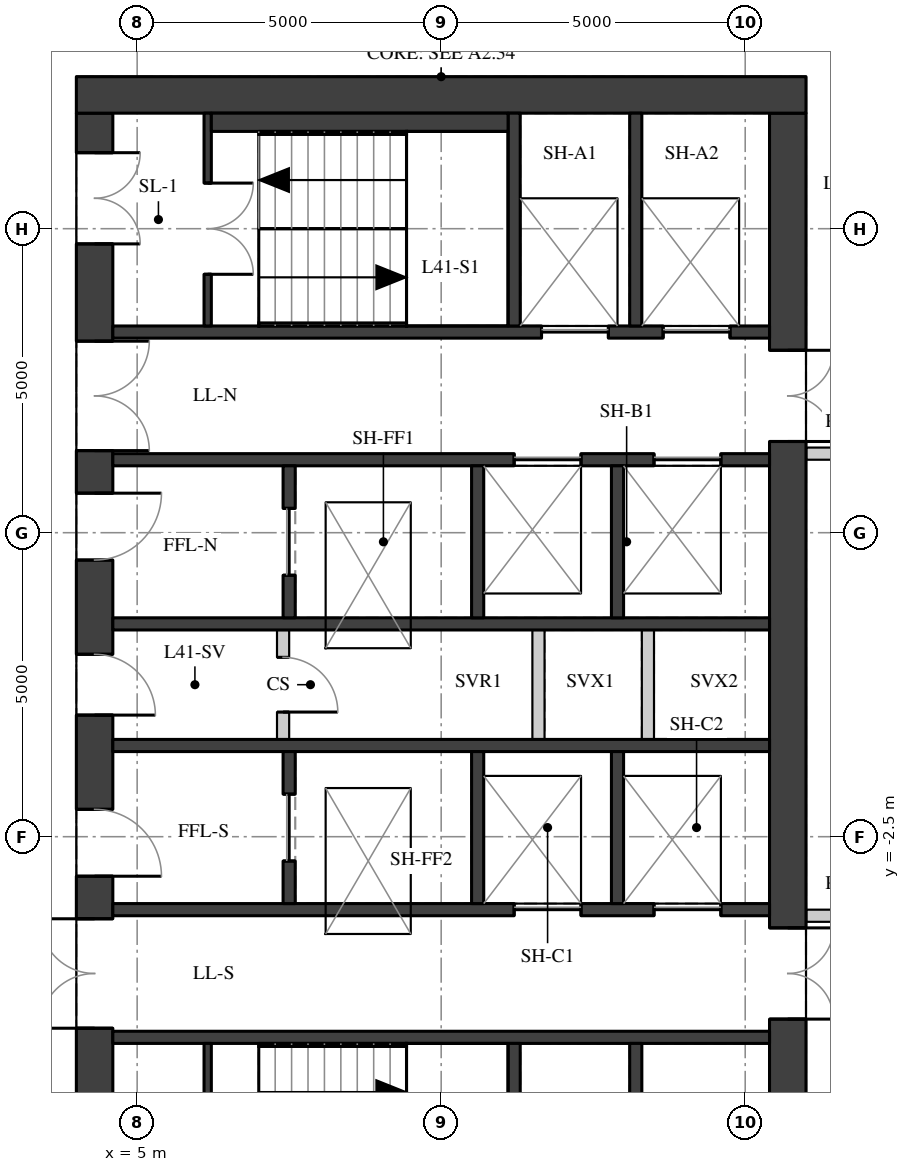
"""IFC4 building model, lengths in metres.
Left out: names, types, materials, properties, quantities, classifications, styles, units other than length and angle.
Written with IfcOpenShell. Run it as: python <this file> out.ifc"""

import sys

from ifc_helpers import new_model, si_unit, direction, frame, frame_2d, origin, place, context, subcontext, project, spatial, rectangle, extrude, element, fill, save


model = new_model("IFC4")
c1 = context("Model", 3, precision=1e-05, world=origin(), true_north=direction((0.0, 1.0)))
c2 = subcontext(c1, "Body", "Model", "MODEL_VIEW")
j1 = project(units=[si_unit("LENGTHUNIT", "METRE"), si_unit("PLANEANGLEUNIT", "RADIAN")], contexts=[c1])
p1 = place(None, origin())
s1 = spatial("IfcSite", under=j1, at=p1, CompositionType="ELEMENT")
p2 = place(p1, origin())
s2 = spatial("IfcBuilding", under=s1, at=p2, CompositionType="ELEMENT")
p3 = place(p2, frame((0.0, 0.0, 148.4)))
s3 = spatial("IfcBuildingStorey", under=s2, at=p3, CompositionType="ELEMENT", Elevation=148.4)
p4 = place(p3, frame((4.3, -9.4, 0.0), z_axis=(0.0, 0.0, 1.0), x_axis=(0.0, 1.0, 0.0)))
e1 = element("IfcWall", 1, at=p4, inside=s3, PredefinedType="SHEAR", context=c2, shape_type="SweptSolid", body=[
    extrude(rectangle(XDim=18.8, YDim=0.6, at=frame_2d((9.4, 0.0))), origin(), (0.0, 0.0, 1.0), 3.02),
])
p5 = place(p4, frame((0.65, 0.0, 0.0)))
e2 = element("IfcOpeningElement", 2, at=p5, cuts=e1, PredefinedType="OPENING", context=c2, shape_type="SweptSolid", body=[
    extrude(rectangle(XDim=1.5, YDim=2.1, at=frame_2d((0.75, 1.05))), frame((0.0, 0.31, 0.0), z_axis=(0.0, -1.0, 0.0), x_axis=(1.0, 0.0, 0.0)), (0.0, 0.0, 1.0), 0.62),
])
p6 = place(p4, frame((3.75, 0.0, 0.0)))
e3 = element("IfcOpeningElement", 3, at=p6, cuts=e1, PredefinedType="OPENING", context=c2, shape_type="SweptSolid", body=[
    extrude(rectangle(XDim=1.8, YDim=2.1, at=frame_2d((0.9, 1.05))), frame((0.0, 0.31, 0.0), z_axis=(0.0, -1.0, 0.0), x_axis=(1.0, 0.0, 0.0)), (0.0, 0.0, 1.0), 0.62),
])
p7 = place(p4, frame((6.25, 0.0, 0.0)))
e4 = element("IfcOpeningElement", 4, at=p7, cuts=e1, PredefinedType="OPENING", context=c2, shape_type="SweptSolid", body=[
    extrude(rectangle(XDim=1.1, YDim=2.1, at=frame_2d((0.55, 1.05))), frame((0.0, 0.31, 0.0), z_axis=(0.0, -1.0, 0.0), x_axis=(1.0, 0.0, 0.0)), (0.0, 0.0, 1.0), 0.62),
])
p8 = place(p4, frame((8.9, 0.0, 0.0)))
e5 = element("IfcOpeningElement", 5, at=p8, cuts=e1, PredefinedType="OPENING", context=c2, shape_type="SweptSolid", body=[
    extrude(rectangle(XDim=1.0, YDim=2.1, at=frame_2d((0.5, 1.05))), frame((0.0, 0.31, 0.0), z_axis=(0.0, -1.0, 0.0), x_axis=(1.0, 0.0, 0.0)), (0.0, 0.0, 1.0), 0.62),
])
p9 = place(p4, frame((11.45, 0.0, 0.0)))
e6 = element("IfcOpeningElement", 6, at=p9, cuts=e1, PredefinedType="OPENING", context=c2, shape_type="SweptSolid", body=[
    extrude(rectangle(XDim=1.1, YDim=2.1, at=frame_2d((0.55, 1.05))), frame((0.0, 0.31, 0.0), z_axis=(0.0, -1.0, 0.0), x_axis=(1.0, 0.0, 0.0)), (0.0, 0.0, 1.0), 0.62),
])
p10 = place(p4, frame((13.25, 0.0, 0.0)))
e7 = element("IfcOpeningElement", 7, at=p10, cuts=e1, PredefinedType="OPENING", context=c2, shape_type="SweptSolid", body=[
    extrude(rectangle(XDim=1.8, YDim=2.1, at=frame_2d((0.9, 1.05))), frame((0.0, 0.31, 0.0), z_axis=(0.0, -1.0, 0.0), x_axis=(1.0, 0.0, 0.0)), (0.0, 0.0, 1.0), 0.62),
])
p11 = place(p4, frame((16.65, 0.0, 0.0)))
e8 = element("IfcOpeningElement", 8, at=p11, cuts=e1, PredefinedType="OPENING", context=c2, shape_type="SweptSolid", body=[
    extrude(rectangle(XDim=1.5, YDim=2.1, at=frame_2d((0.75, 1.05))), frame((0.0, 0.31, 0.0), z_axis=(0.0, -1.0, 0.0), x_axis=(1.0, 0.0, 0.0)), (0.0, 0.0, 1.0), 0.62),
])
p12 = place(p3, frame((15.7, -9.4, 0.0), z_axis=(0.0, 0.0, 1.0), x_axis=(0.0, 1.0, 0.0)))
e9 = element("IfcWall", 9, at=p12, inside=s3, PredefinedType="SHEAR", context=c2, shape_type="SweptSolid", body=[
    extrude(rectangle(XDim=18.8, YDim=0.6, at=frame_2d((9.4, 0.0))), origin(), (0.0, 0.0, 1.0), 3.02),
])
p13 = place(p12, frame((13.4, 0.0, 0.0)))
e10 = element("IfcOpeningElement", 10, at=p13, cuts=e9, PredefinedType="OPENING", context=c2, shape_type="SweptSolid", body=[
    extrude(rectangle(XDim=1.5, YDim=2.1, at=frame_2d((0.75, 1.05))), frame((0.0, 0.31, 0.0), z_axis=(0.0, -1.0, 0.0), x_axis=(1.0, 0.0, 0.0)), (0.0, 0.0, 1.0), 0.62),
])
p14 = place(p12, frame((3.9, 0.0, 0.0)))
e11 = element("IfcOpeningElement", 11, at=p14, cuts=e9, PredefinedType="OPENING", context=c2, shape_type="SweptSolid", body=[
    extrude(rectangle(XDim=1.5, YDim=2.1, at=frame_2d((0.75, 1.05))), frame((0.0, 0.31, 0.0), z_axis=(0.0, -1.0, 0.0), x_axis=(1.0, 0.0, 0.0)), (0.0, 0.0, 1.0), 0.62),
])
p15 = place(p3, frame((4.0, 9.7, 0.0), z_axis=(0.0, 0.0, 1.0), x_axis=(1.0, 0.0, 0.0)))
e12 = element("IfcWall", 12, at=p15, inside=s3, PredefinedType="SHEAR", context=c2, shape_type="SweptSolid", body=[
    extrude(rectangle(XDim=12.0, YDim=0.6, at=frame_2d((6.0, 0.0))), origin(), (0.0, 0.0, 1.0), 3.02),
])
p16 = place(p3, frame((4.6, 5.8, 0.0), z_axis=(0.0, 0.0, 1.0), x_axis=(1.0, 0.0, 0.0)))
e13 = element("IfcWall", 13, at=p16, inside=s3, PredefinedType="SHEAR", context=c2, shape_type="SweptSolid", body=[
    extrude(rectangle(XDim=10.8, YDim=0.2, at=frame_2d((5.4, 0.0))), origin(), (0.0, 0.0, 1.0), 3.02),
])
p17 = place(p16, frame((7.05, 0.0, 0.0)))
e14 = element("IfcOpeningElement", 14, at=p17, cuts=e13, PredefinedType="OPENING", context=c2, shape_type="SweptSolid", body=[
    extrude(rectangle(XDim=1.1, YDim=2.1, at=frame_2d((0.55, 1.05))), frame((0.0, 0.11, 0.0), z_axis=(0.0, -1.0, 0.0), x_axis=(1.0, 0.0, 0.0)), (0.0, 0.0, 1.0), 0.22),
])
p18 = place(p16, frame((9.05, 0.0, 0.0)))
e15 = element("IfcOpeningElement", 15, at=p18, cuts=e13, PredefinedType="OPENING", context=c2, shape_type="SweptSolid", body=[
    extrude(rectangle(XDim=1.1, YDim=2.1, at=frame_2d((0.55, 1.05))), frame((0.0, 0.11, 0.0), z_axis=(0.0, -1.0, 0.0), x_axis=(1.0, 0.0, 0.0)), (0.0, 0.0, 1.0), 0.22),
])
p19 = place(p3, frame((4.6, 3.7, 0.0), z_axis=(0.0, 0.0, 1.0), x_axis=(1.0, 0.0, 0.0)))
e16 = element("IfcWall", 16, at=p19, inside=s3, PredefinedType="SHEAR", context=c2, shape_type="SweptSolid", body=[
    extrude(rectangle(XDim=10.8, YDim=0.2, at=frame_2d((5.4, 0.0))), origin(), (0.0, 0.0, 1.0), 3.02),
])
p20 = place(p19, frame((6.6, 0.0, 0.0)))
e17 = element("IfcOpeningElement", 17, at=p20, cuts=e16, PredefinedType="OPENING", context=c2, shape_type="SweptSolid", body=[
    extrude(rectangle(XDim=1.1, YDim=2.1, at=frame_2d((0.55, 1.05))), frame((0.0, 0.11, 0.0), z_axis=(0.0, -1.0, 0.0), x_axis=(1.0, 0.0, 0.0)), (0.0, 0.0, 1.0), 0.22),
])
p21 = place(p19, frame((8.9, 0.0, 0.0)))
e18 = element("IfcOpeningElement", 18, at=p21, cuts=e16, PredefinedType="OPENING", context=c2, shape_type="SweptSolid", body=[
    extrude(rectangle(XDim=1.1, YDim=2.1, at=frame_2d((0.55, 1.05))), frame((0.0, 0.11, 0.0), z_axis=(0.0, -1.0, 0.0), x_axis=(1.0, 0.0, 0.0)), (0.0, 0.0, 1.0), 0.22),
])
for number, where, z_axis, x_axis in (
    (19, (4.6, 1.0, 0.0), (0.0, 0.0, 1.0), (1.0, 0.0, 0.0)),
    (20, (4.6, -1.0, 0.0), (0.0, 0.0, 1.0), (1.0, 0.0, 0.0)),
):
    element("IfcWall", number, at=place(p3, frame(where, z_axis=z_axis, x_axis=x_axis)), inside=s3, PredefinedType="SHEAR", context=c2, shape_type="SweptSolid", body=[
        extrude(rectangle(XDim=10.8, YDim=0.2, at=frame_2d((5.4, 0.0))), origin(), (0.0, 0.0, 1.0), 3.02),
    ])
p22 = place(p3, frame((4.6, -3.7, 0.0), z_axis=(0.0, 0.0, 1.0), x_axis=(1.0, 0.0, 0.0)))
e21 = element("IfcWall", 21, at=p22, inside=s3, PredefinedType="SHEAR", context=c2, shape_type="SweptSolid", body=[
    extrude(rectangle(XDim=10.8, YDim=0.2, at=frame_2d((5.4, 0.0))), origin(), (0.0, 0.0, 1.0), 3.02),
])
p23 = place(p22, frame((6.6, 0.0, 0.0)))
e22 = element("IfcOpeningElement", 22, at=p23, cuts=e21, PredefinedType="OPENING", context=c2, shape_type="SweptSolid", body=[
    extrude(rectangle(XDim=1.1, YDim=2.1, at=frame_2d((0.55, 1.05))), frame((0.0, 0.11, 0.0), z_axis=(0.0, -1.0, 0.0), x_axis=(1.0, 0.0, 0.0)), (0.0, 0.0, 1.0), 0.22),
])
p24 = place(p22, frame((8.9, 0.0, 0.0)))
e23 = element("IfcOpeningElement", 23, at=p24, cuts=e21, PredefinedType="OPENING", context=c2, shape_type="SweptSolid", body=[
    extrude(rectangle(XDim=1.1, YDim=2.1, at=frame_2d((0.55, 1.05))), frame((0.0, 0.11, 0.0), z_axis=(0.0, -1.0, 0.0), x_axis=(1.0, 0.0, 0.0)), (0.0, 0.0, 1.0), 0.22),
])
p25 = place(p3, frame((4.6, -5.8, 0.0), z_axis=(0.0, 0.0, 1.0), x_axis=(1.0, 0.0, 0.0)))
e24 = element("IfcWall", 24, at=p25, inside=s3, PredefinedType="SHEAR", context=c2, shape_type="SweptSolid", body=[
    extrude(rectangle(XDim=10.8, YDim=0.2, at=frame_2d((5.4, 0.0))), origin(), (0.0, 0.0, 1.0), 3.02),
])
for number, where, z_axis, x_axis in (
    (25, (11.2, 5.9, 0.0), (0.0, 0.0, 1.0), (0.0, 1.0, 0.0)),
    (26, (11.2, -9.4, 0.0), (0.0, 0.0, 1.0), (0.0, 1.0, 0.0)),
    (27, (13.2, 5.9, 0.0), (0.0, 0.0, 1.0), (0.0, 1.0, 0.0)),
    (28, (13.2, -9.4, 0.0), (0.0, 0.0, 1.0), (0.0, 1.0, 0.0)),
):
    element("IfcWall", number, at=place(p3, frame(where, z_axis=z_axis, x_axis=x_axis)), inside=s3, PredefinedType="SHEAR", context=c2, shape_type="SweptSolid", body=[
        extrude(rectangle(XDim=3.5, YDim=0.2, at=frame_2d((1.75, 0.0))), origin(), (0.0, 0.0, 1.0), 3.02),
    ])
p26 = place(p3, frame((7.5, 1.1, 0.0), z_axis=(0.0, 0.0, 1.0), x_axis=(0.0, 1.0, 0.0)))
e29 = element("IfcWall", 29, at=p26, inside=s3, PredefinedType="SHEAR", context=c2, shape_type="SweptSolid", body=[
    extrude(rectangle(XDim=2.5, YDim=0.2, at=frame_2d((1.25, 0.0))), origin(), (0.0, 0.0, 1.0), 3.02),
])
p27 = place(p26, frame((0.7, 0.0, 0.0)))
e30 = element("IfcOpeningElement", 30, at=p27, cuts=e29, PredefinedType="OPENING", context=c2, shape_type="SweptSolid", body=[
    extrude(rectangle(XDim=1.1, YDim=2.1, at=frame_2d((0.55, 1.05))), frame((0.0, 0.11, 0.0), z_axis=(0.0, -1.0, 0.0), x_axis=(1.0, 0.0, 0.0)), (0.0, 0.0, 1.0), 0.22),
])
p28 = place(p3, frame((7.5, -3.6, 0.0), z_axis=(0.0, 0.0, 1.0), x_axis=(0.0, 1.0, 0.0)))
e31 = element("IfcWall", 31, at=p28, inside=s3, PredefinedType="SHEAR", context=c2, shape_type="SweptSolid", body=[
    extrude(rectangle(XDim=2.5, YDim=0.2, at=frame_2d((1.25, 0.0))), origin(), (0.0, 0.0, 1.0), 3.02),
])
p29 = place(p28, frame((0.7, 0.0, 0.0)))
e32 = element("IfcOpeningElement", 32, at=p29, cuts=e31, PredefinedType="OPENING", context=c2, shape_type="SweptSolid", body=[
    extrude(rectangle(XDim=1.1, YDim=2.1, at=frame_2d((0.55, 1.05))), frame((0.0, 0.11, 0.0), z_axis=(0.0, -1.0, 0.0), x_axis=(1.0, 0.0, 0.0)), (0.0, 0.0, 1.0), 0.22),
])
for number, where, z_axis, x_axis in (
    (33, (10.6, 1.1, 0.0), (0.0, 0.0, 1.0), (0.0, 1.0, 0.0)),
    (34, (10.6, -3.6, 0.0), (0.0, 0.0, 1.0), (0.0, 1.0, 0.0)),
    (35, (12.9, 1.1, 0.0), (0.0, 0.0, 1.0), (0.0, 1.0, 0.0)),
    (36, (12.9, -3.6, 0.0), (0.0, 0.0, 1.0), (0.0, 1.0, 0.0)),
):
    element("IfcWall", number, at=place(p3, frame(where, z_axis=z_axis, x_axis=x_axis)), inside=s3, PredefinedType="SHEAR", context=c2, shape_type="SweptSolid", body=[
        extrude(rectangle(XDim=2.5, YDim=0.2, at=frame_2d((1.25, 0.0))), origin(), (0.0, 0.0, 1.0), 3.02),
    ])
p30 = place(p3, frame((6.16, 5.9, 0.0), z_axis=(0.0, 0.0, 1.0), x_axis=(0.0, 1.0, 0.0)))
e37 = element("IfcWall", 37, at=p30, inside=s3, PredefinedType="SHEAR", context=c2, shape_type="SweptSolid", body=[
    extrude(rectangle(XDim=3.5, YDim=0.12, at=frame_2d((1.75, 0.0))), origin(), (0.0, 0.0, 1.0), 3.02),
])
p31 = place(p30, frame((0.85, 0.0, 0.0)))
e38 = element("IfcOpeningElement", 38, at=p31, cuts=e37, PredefinedType="OPENING", context=c2, shape_type="SweptSolid", body=[
    extrude(rectangle(XDim=1.5, YDim=2.1, at=frame_2d((0.75, 1.05))), frame((0.0, 0.07, 0.0), z_axis=(0.0, -1.0, 0.0), x_axis=(1.0, 0.0, 0.0)), (0.0, 0.0, 1.0), 0.14),
])
p32 = place(p3, frame((6.16, -9.4, 0.0), z_axis=(0.0, 0.0, 1.0), x_axis=(0.0, 1.0, 0.0)))
e39 = element("IfcWall", 39, at=p32, inside=s3, PredefinedType="SHEAR", context=c2, shape_type="SweptSolid", body=[
    extrude(rectangle(XDim=3.5, YDim=0.12, at=frame_2d((1.75, 0.0))), origin(), (0.0, 0.0, 1.0), 3.02),
])
p33 = place(p32, frame((1.15, 0.0, 0.0)))
e40 = element("IfcOpeningElement", 40, at=p33, cuts=e39, PredefinedType="OPENING", context=c2, shape_type="SweptSolid", body=[
    extrude(rectangle(XDim=1.5, YDim=2.1, at=frame_2d((0.75, 1.05))), frame((0.0, 0.07, 0.0), z_axis=(0.0, -1.0, 0.0), x_axis=(1.0, 0.0, 0.0)), (0.0, 0.0, 1.0), 0.14),
])
p34 = place(p3, frame((7.4, -0.9, 0.0), z_axis=(0.0, 0.0, 1.0), x_axis=(0.0, 1.0, 0.0)))
e41 = element("IfcWall", 41, at=p34, inside=s3, PredefinedType="PARTITIONING", context=c2, shape_type="SweptSolid", body=[
    extrude(rectangle(XDim=1.8, YDim=0.2, at=frame_2d((0.9, 0.0))), origin(), (0.0, 0.0, 1.0), 3.02),
])
p35 = place(p34, frame((0.45, 0.0, 0.0)))
e42 = element("IfcOpeningElement", 42, at=p35, cuts=e41, PredefinedType="OPENING", context=c2, shape_type="SweptSolid", body=[
    extrude(rectangle(XDim=0.9, YDim=2.1, at=frame_2d((0.45, 1.05))), frame((0.0, 0.11, 0.0), z_axis=(0.0, -1.0, 0.0), x_axis=(1.0, 0.0, 0.0)), (0.0, 0.0, 1.0), 0.22),
])
for number, where, z_axis, x_axis in (
    (43, (11.6, -0.9, 0.0), (0.0, 0.0, 1.0), (0.0, 1.0, 0.0)),
    (44, (13.4, -0.9, 0.0), (0.0, 0.0, 1.0), (0.0, 1.0, 0.0)),
):
    element("IfcWall", number, at=place(p3, frame(where, z_axis=z_axis, x_axis=x_axis)), inside=s3, PredefinedType="PARTITIONING", context=c2, shape_type="SweptSolid", body=[
        extrude(rectangle(XDim=1.8, YDim=0.2, at=frame_2d((0.9, 0.0))), origin(), (0.0, 0.0, 1.0), 3.02),
    ])
p36 = place(p3, frame((6.22, 9.25, 0.0), z_axis=(0.0, 0.0, 1.0), x_axis=(1.0, 0.0, 0.0)))
e45 = element("IfcWall", 45, at=p36, inside=s3, PredefinedType="PARTITIONING", context=c2, shape_type="SweptSolid", body=[
    extrude(rectangle(XDim=4.88, YDim=0.3, at=frame_2d((2.44, 0.0))), origin(), (0.0, 0.0, 1.0), 3.02),
])
for number, where, z_axis, x_axis in (
    (46, (17.5, 3.8, 0.0), (0.0, 0.0, 1.0), (-1.0, 0.0, 0.0)),
    (47, (16.004, -3.8, 0.0), (0.0, 0.0, 1.0), (1.0, 0.0, 0.0)),
):
    element("IfcWall", number, at=place(p3, frame(where, z_axis=z_axis, x_axis=x_axis)), inside=s3, PredefinedType="PARTITIONING", context=c2, shape_type="SweptSolid", body=[
        extrude(rectangle(XDim=1.496, YDim=0.2, at=frame_2d((0.748, 0.0))), origin(), (0.0, 0.0, 1.0), 2.57),
    ])
p37 = place(p6, origin())
e48 = element("IfcDoor", 48, at=p37, inside=s3, OperationType="DOUBLE_DOOR_SINGLE_SWING", PredefinedType="DOOR", context=c2, shape_type="SweptSolid", body=[
    extrude(rectangle(XDim=1.8, YDim=2.1, at=frame_2d((0.9, 1.05))), frame((0.0, 0.025, 0.0), z_axis=(0.0, -1.0, 0.0), x_axis=(1.0, 0.0, 0.0)), (0.0, 0.0, 1.0), 0.05),
])
fill(e3, e48)
p38 = place(p7, origin())
e49 = element("IfcDoor", 49, at=p38, inside=s3, OperationType="SINGLE_SWING_RIGHT", PredefinedType="DOOR", context=c2, shape_type="SweptSolid", body=[
    extrude(rectangle(XDim=1.1, YDim=2.1, at=frame_2d((0.55, 1.05))), frame((0.0, 0.025, 0.0), z_axis=(0.0, -1.0, 0.0), x_axis=(1.0, 0.0, 0.0)), (0.0, 0.0, 1.0), 0.05),
])
fill(e4, e49)
p39 = place(p8, origin())
e50 = element("IfcDoor", 50, at=p39, inside=s3, OperationType="SINGLE_SWING_RIGHT", PredefinedType="DOOR", context=c2, shape_type="SweptSolid", body=[
    extrude(rectangle(XDim=1.0, YDim=2.1, at=frame_2d((0.5, 1.05))), frame((0.0, 0.025, 0.0), z_axis=(0.0, -1.0, 0.0), x_axis=(1.0, 0.0, 0.0)), (0.0, 0.0, 1.0), 0.05),
])
fill(e5, e50)
p40 = place(p9, origin())
e51 = element("IfcDoor", 51, at=p40, inside=s3, OperationType="SINGLE_SWING_LEFT", PredefinedType="DOOR", context=c2, shape_type="SweptSolid", body=[
    extrude(rectangle(XDim=1.1, YDim=2.1, at=frame_2d((0.55, 1.05))), frame((0.0, 0.025, 0.0), z_axis=(0.0, -1.0, 0.0), x_axis=(1.0, 0.0, 0.0)), (0.0, 0.0, 1.0), 0.05),
])
fill(e6, e51)
p41 = place(p10, origin())
e52 = element("IfcDoor", 52, at=p41, inside=s3, OperationType="DOUBLE_DOOR_SINGLE_SWING", PredefinedType="DOOR", context=c2, shape_type="SweptSolid", body=[
    extrude(rectangle(XDim=1.8, YDim=2.1, at=frame_2d((0.9, 1.05))), frame((0.0, 0.025, 0.0), z_axis=(0.0, -1.0, 0.0), x_axis=(1.0, 0.0, 0.0)), (0.0, 0.0, 1.0), 0.05),
])
fill(e7, e52)
p42 = place(p11, origin())
e53 = element("IfcDoor", 53, at=p42, inside=s3, OperationType="DOUBLE_DOOR_SINGLE_SWING", PredefinedType="DOOR", context=c2, shape_type="SweptSolid", body=[
    extrude(rectangle(XDim=1.5, YDim=2.1, at=frame_2d((0.75, 1.05))), frame((0.0, 0.025, 0.0), z_axis=(0.0, -1.0, 0.0), x_axis=(1.0, 0.0, 0.0)), (0.0, 0.0, 1.0), 0.05),
])
fill(e8, e53)
p43 = place(p13, origin())
e54 = element("IfcDoor", 54, at=p43, inside=s3, OperationType="DOUBLE_DOOR_SINGLE_SWING", PredefinedType="DOOR", context=c2, shape_type="SweptSolid", body=[
    extrude(rectangle(XDim=1.5, YDim=2.1, at=frame_2d((0.75, 1.05))), frame((0.0, 0.025, 0.0), z_axis=(0.0, -1.0, 0.0), x_axis=(1.0, 0.0, 0.0)), (0.0, 0.0, 1.0), 0.05),
])
fill(e10, e54)
p44 = place(p14, origin())
e55 = element("IfcDoor", 55, at=p44, inside=s3, OperationType="DOUBLE_DOOR_SINGLE_SWING", PredefinedType="DOOR", context=c2, shape_type="SweptSolid", body=[
    extrude(rectangle(XDim=1.5, YDim=2.1, at=frame_2d((0.75, 1.05))), frame((0.0, 0.025, 0.0), z_axis=(0.0, -1.0, 0.0), x_axis=(1.0, 0.0, 0.0)), (0.0, 0.0, 1.0), 0.05),
])
fill(e11, e55)
p45 = place(p31, origin())
e56 = element("IfcDoor", 56, at=p45, inside=s3, OperationType="DOUBLE_DOOR_SINGLE_SWING", PredefinedType="DOOR", context=c2, shape_type="SweptSolid", body=[
    extrude(rectangle(XDim=1.5, YDim=2.1, at=frame_2d((0.75, 1.05))), frame((0.0, 0.025, 0.0), z_axis=(0.0, -1.0, 0.0), x_axis=(1.0, 0.0, 0.0)), (0.0, 0.0, 1.0), 0.05),
])
fill(e38, e56)
p46 = place(p17, origin())
e57 = element("IfcDoor", 57, at=p46, inside=s3, OperationType="DOUBLE_DOOR_SLIDING", PredefinedType="DOOR", context=c2, shape_type="SweptSolid", body=[
    extrude(rectangle(XDim=1.1, YDim=2.1, at=frame_2d((0.55, 1.05))), frame((0.0, 0.025, 0.0), z_axis=(0.0, -1.0, 0.0), x_axis=(1.0, 0.0, 0.0)), (0.0, 0.0, 1.0), 0.05),
])
fill(e14, e57)
p47 = place(p18, origin())
e58 = element("IfcDoor", 58, at=p47, inside=s3, OperationType="DOUBLE_DOOR_SLIDING", PredefinedType="DOOR", context=c2, shape_type="SweptSolid", body=[
    extrude(rectangle(XDim=1.1, YDim=2.1, at=frame_2d((0.55, 1.05))), frame((0.0, 0.025, 0.0), z_axis=(0.0, -1.0, 0.0), x_axis=(1.0, 0.0, 0.0)), (0.0, 0.0, 1.0), 0.05),
])
fill(e15, e58)
p48 = place(p20, origin())
e59 = element("IfcDoor", 59, at=p48, inside=s3, OperationType="DOUBLE_DOOR_SLIDING", PredefinedType="DOOR", context=c2, shape_type="SweptSolid", body=[
    extrude(rectangle(XDim=1.1, YDim=2.1, at=frame_2d((0.55, 1.05))), frame((0.0, 0.025, 0.0), z_axis=(0.0, -1.0, 0.0), x_axis=(1.0, 0.0, 0.0)), (0.0, 0.0, 1.0), 0.05),
])
fill(e17, e59)
p49 = place(p21, origin())
e60 = element("IfcDoor", 60, at=p49, inside=s3, OperationType="DOUBLE_DOOR_SLIDING", PredefinedType="DOOR", context=c2, shape_type="SweptSolid", body=[
    extrude(rectangle(XDim=1.1, YDim=2.1, at=frame_2d((0.55, 1.05))), frame((0.0, 0.025, 0.0), z_axis=(0.0, -1.0, 0.0), x_axis=(1.0, 0.0, 0.0)), (0.0, 0.0, 1.0), 0.05),
])
fill(e18, e60)
p50 = place(p23, origin())
e61 = element("IfcDoor", 61, at=p50, inside=s3, OperationType="DOUBLE_DOOR_SLIDING", PredefinedType="DOOR", context=c2, shape_type="SweptSolid", body=[
    extrude(rectangle(XDim=1.1, YDim=2.1, at=frame_2d((0.55, 1.05))), frame((0.0, 0.025, 0.0), z_axis=(0.0, -1.0, 0.0), x_axis=(1.0, 0.0, 0.0)), (0.0, 0.0, 1.0), 0.05),
])
fill(e22, e61)
p51 = place(p24, origin())
e62 = element("IfcDoor", 62, at=p51, inside=s3, OperationType="DOUBLE_DOOR_SLIDING", PredefinedType="DOOR", context=c2, shape_type="SweptSolid", body=[
    extrude(rectangle(XDim=1.1, YDim=2.1, at=frame_2d((0.55, 1.05))), frame((0.0, 0.025, 0.0), z_axis=(0.0, -1.0, 0.0), x_axis=(1.0, 0.0, 0.0)), (0.0, 0.0, 1.0), 0.05),
])
fill(e23, e62)
p52 = place(p27, origin())
e63 = element("IfcDoor", 63, at=p52, inside=s3, OperationType="DOUBLE_DOOR_SLIDING", PredefinedType="DOOR", context=c2, shape_type="SweptSolid", body=[
    extrude(rectangle(XDim=1.1, YDim=2.1, at=frame_2d((0.55, 1.05))), frame((0.0, 0.025, 0.0), z_axis=(0.0, -1.0, 0.0), x_axis=(1.0, 0.0, 0.0)), (0.0, 0.0, 1.0), 0.05),
])
fill(e30, e63)
p53 = place(p29, origin())
e64 = element("IfcDoor", 64, at=p53, inside=s3, OperationType="DOUBLE_DOOR_SLIDING", PredefinedType="DOOR", context=c2, shape_type="SweptSolid", body=[
    extrude(rectangle(XDim=1.1, YDim=2.1, at=frame_2d((0.55, 1.05))), frame((0.0, 0.025, 0.0), z_axis=(0.0, -1.0, 0.0), x_axis=(1.0, 0.0, 0.0)), (0.0, 0.0, 1.0), 0.05),
])
fill(e32, e64)
p54 = place(p35, origin())
e65 = element("IfcDoor", 65, at=p54, inside=s3, OperationType="SINGLE_SWING_RIGHT", PredefinedType="DOOR", context=c2, shape_type="SweptSolid", body=[
    extrude(rectangle(XDim=0.9, YDim=2.1, at=frame_2d((0.45, 1.05))), frame((0.0, 0.025, 0.0), z_axis=(0.0, -1.0, 0.0), x_axis=(1.0, 0.0, 0.0)), (0.0, 0.0, 1.0), 0.05),
])
fill(e42, e65)
save(model, sys.argv[1])
